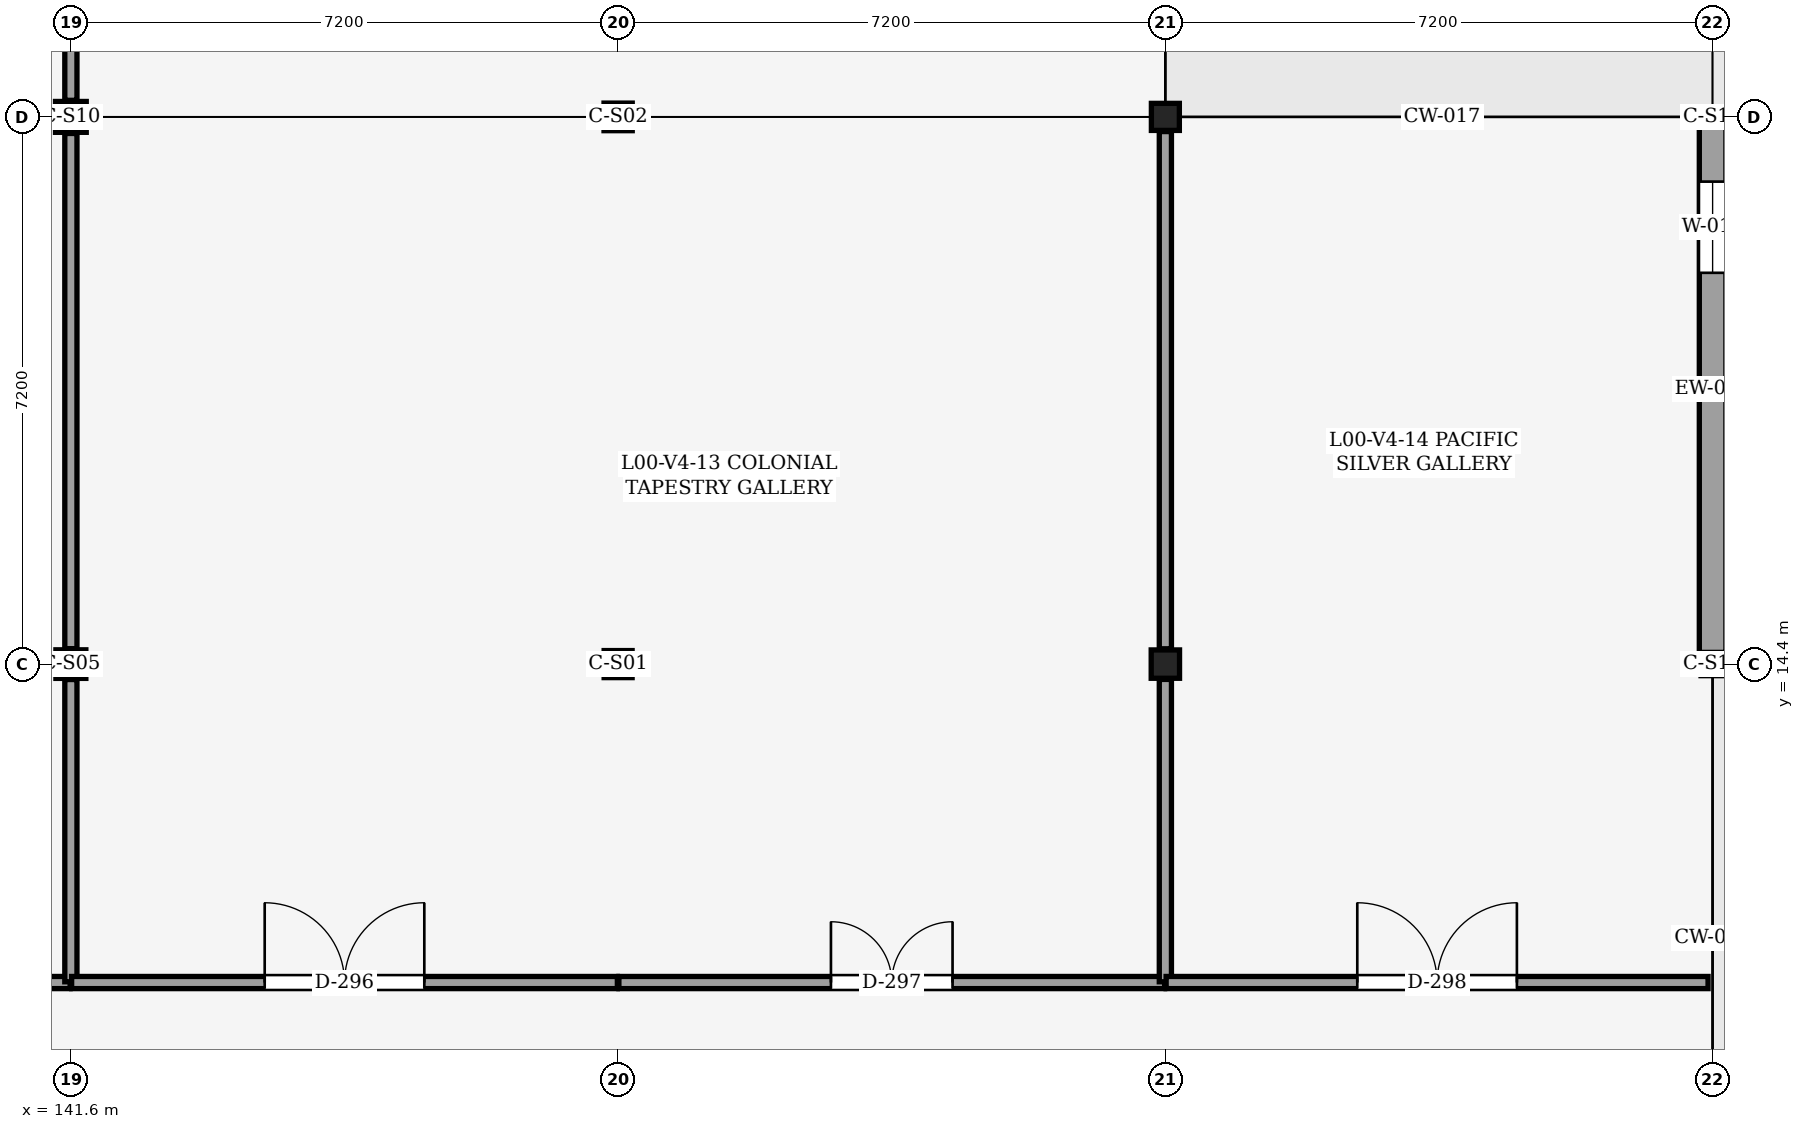
"""IFC4 building model, lengths in metres.
Left out: names, types, materials, properties, quantities, classifications, styles, units other than length and angle.
Written with IfcOpenShell. Run it as: python <this file> out.ifc"""

import sys

from ifc_helpers import new_model, si_unit, direction, frame, frame_2d, origin, origin_2d, place, context, subcontext, project, spatial, rectangle, hollow_rectangle, i_section, extrude, element, fill, save


model = new_model("IFC4")
c1 = context("Model", 3, precision=1e-05, world=origin(), true_north=direction((0.0, 1.0)))
c2 = subcontext(c1, "Body", "Model", "MODEL_VIEW")
j1 = project(units=[si_unit("LENGTHUNIT", "METRE"), si_unit("PLANEANGLEUNIT", "RADIAN")], contexts=[c1])
p1 = place(None, origin())
s1 = spatial("IfcSite", under=j1, at=p1, CompositionType="ELEMENT")
p2 = place(p1, origin())
s2 = spatial("IfcBuilding", under=s1, at=p2, CompositionType="ELEMENT")
p3 = place(p2, origin())
s3 = spatial("IfcBuildingStorey", under=s2, at=p3, CompositionType="ELEMENT", Elevation=0.0)
p4 = place(p3, frame((141.6, 14.4, 0.0), z_axis=(0.0, 0.0, 1.0), x_axis=(1.0, 0.0, 0.0)))
e1 = element("IfcColumn", 1, at=p4, inside=s3, PredefinedType="COLUMN", context=c2, shape_type="SweptSolid", body=[
    extrude(i_section(OverallWidth=0.394, OverallDepth=0.376, WebThickness=0.017, FlangeThickness=0.028, FilletRadius=0.025, at=origin_2d()), origin(), (0.0, 0.0, 1.0), 5.4),
])
p5 = place(p3, frame((141.6, 21.6, 0.0), z_axis=(0.0, 0.0, 1.0), x_axis=(1.0, 0.0, 0.0)))
e2 = element("IfcColumn", 2, at=p5, inside=s3, PredefinedType="COLUMN", context=c2, shape_type="SweptSolid", body=[
    extrude(i_section(OverallWidth=0.404, OverallDepth=0.406, WebThickness=0.027, FlangeThickness=0.044, FilletRadius=0.025, at=origin_2d()), origin(), (0.0, 0.0, 1.0), 5.4),
])
p6 = place(p3, frame((148.8, 14.4, 0.0), z_axis=(0.0, 0.0, 1.0), x_axis=(1.0, 0.0, 0.0)))
e3 = element("IfcColumn", 3, at=p6, inside=s3, PredefinedType="COLUMN", context=c2, shape_type="SweptSolid", body=[
    extrude(i_section(OverallWidth=0.368, OverallDepth=0.356, WebThickness=0.011, FlangeThickness=0.018, FilletRadius=0.025, at=origin_2d()), origin(), (0.0, 0.0, 1.0), 5.4),
])
p7 = place(p3, frame((148.8, 21.6, 0.0), z_axis=(0.0, 0.0, 1.0), x_axis=(1.0, 0.0, 0.0)))
e4 = element("IfcColumn", 4, at=p7, inside=s3, PredefinedType="COLUMN", context=c2, shape_type="SweptSolid", body=[
    extrude(i_section(OverallWidth=0.371, OverallDepth=0.363, WebThickness=0.013, FlangeThickness=0.022, FilletRadius=0.025, at=origin_2d()), origin(), (0.0, 0.0, 1.0), 5.4),
])
p8 = place(p3, frame((156.0, 14.4, 0.0), z_axis=(0.0, 0.0, 1.0), x_axis=(1.0, 0.0, 0.0)))
e5 = element("IfcColumn", 5, at=p8, inside=s3, PredefinedType="COLUMN", context=c2, shape_type="SweptSolid", body=[
    extrude(i_section(OverallWidth=0.373, OverallDepth=0.373, WebThickness=0.016, FlangeThickness=0.026, FilletRadius=0.025, at=origin_2d()), origin(), (0.0, 0.0, 1.0), 5.4),
])
p9 = place(p3, frame((156.0, 21.6, 0.0), z_axis=(0.0, 0.0, 1.0), x_axis=(1.0, 0.0, 0.0)))
e6 = element("IfcColumn", 6, at=p9, inside=s3, PredefinedType="COLUMN", context=c2, shape_type="SweptSolid", body=[
    extrude(i_section(OverallWidth=0.368, OverallDepth=0.356, WebThickness=0.011, FlangeThickness=0.018, FilletRadius=0.025, at=origin_2d()), origin(), (0.0, 0.0, 1.0), 5.4),
])
p10 = place(p3, frame((163.2, 14.4, 0.0), z_axis=(0.0, 0.0, 1.0), x_axis=(1.0, 0.0, 0.0)))
e7 = element("IfcColumn", 7, at=p10, inside=s3, PredefinedType="COLUMN", context=c2, shape_type="SweptSolid", body=[
    extrude(hollow_rectangle(XDim=0.305, YDim=0.305, WallThickness=0.016, OuterFilletRadius=0.032, at=origin_2d()), origin(), (0.0, 0.0, 1.0), 5.4),
])
p11 = place(p3, frame((163.2, 21.6, 0.0), z_axis=(0.0, 0.0, 1.0), x_axis=(1.0, 0.0, 0.0)))
e8 = element("IfcColumn", 8, at=p11, inside=s3, PredefinedType="COLUMN", context=c2, shape_type="SweptSolid", body=[
    extrude(hollow_rectangle(XDim=0.203, YDim=0.203, WallThickness=0.013, OuterFilletRadius=0.025, at=origin_2d()), origin(), (0.0, 0.0, 1.0), 5.4),
])
p12 = place(p3, frame((163.2, 21.498, 0.0), z_axis=(0.0, 0.0, 1.0), x_axis=(0.0, -1.0, 0.0)))
e9 = element("IfcWall", 9, at=p12, inside=s3, PredefinedType="SOLIDWALL", context=c2, shape_type="SweptSolid", body=[
    extrude(rectangle(XDim=6.946, YDim=0.35, at=frame_2d((3.473, 0.0))), origin(), (0.0, 0.0, 1.0), 4.533),
])
p13 = place(p12, frame((0.75, 0.0, 0.9)))
e10 = element("IfcOpeningElement", 10, at=p13, cuts=e9, PredefinedType="OPENING", context=c2, shape_type="SweptSolid", body=[
    extrude(rectangle(XDim=1.2, YDim=1.5, at=frame_2d((0.6, 0.75))), frame((0.0, 0.185, 0.0), z_axis=(0.0, -1.0, 0.0), x_axis=(1.0, 0.0, 0.0)), (0.0, 0.0, 1.0), 0.371),
])
p14 = place(p3, frame((134.41, 10.21, 0.0), z_axis=(0.0, 0.0, 1.0), x_axis=(1.0, 0.0, 0.0)))
e11 = element("IfcWall", 11, at=p14, inside=s3, PredefinedType="PARTITIONING", context=c2, shape_type="SweptSolid", body=[
    extrude(rectangle(XDim=7.18, YDim=0.16, at=frame_2d((3.59, 0.0))), origin(), (0.0, 0.0, 1.0), 5.14),
])
p15 = place(p14, frame((2.815, 0.0, 0.0)))
e12 = element("IfcOpeningElement", 12, at=p15, cuts=e11, PredefinedType="OPENING", context=c2, shape_type="SweptSolid", body=[
    extrude(rectangle(XDim=1.55, YDim=2.3, at=frame_2d((0.775, 1.15))), frame((0.0, 0.09, 0.0), z_axis=(0.0, -1.0, 0.0), x_axis=(1.0, 0.0, 0.0)), (0.0, 0.0, 1.0), 0.18),
])
p16 = place(p3, frame((141.6, 10.22, 0.0), z_axis=(0.0, 0.0, 1.0), x_axis=(0.0, 1.0, 0.0)))
e13 = element("IfcWall", 13, at=p16, inside=s3, PredefinedType="PARTITIONING", context=c2, shape_type="SweptSolid", body=[
    extrude(rectangle(XDim=3.977, YDim=0.16, at=frame_2d((1.989, 0.0))), origin(), (0.0, 0.0, 1.0), 4.533),
])
p17 = place(p3, frame((141.6, 14.603, 0.0), z_axis=(0.0, 0.0, 1.0), x_axis=(0.0, 1.0, 0.0)))
e14 = element("IfcWall", 14, at=p17, inside=s3, PredefinedType="PARTITIONING", context=c2, shape_type="SweptSolid", body=[
    extrude(rectangle(XDim=6.779, YDim=0.16, at=frame_2d((3.39, 0.0))), origin(), (0.0, 0.0, 1.0), 4.607),
])
p18 = place(p3, frame((141.61, 10.21, 0.0), z_axis=(0.0, 0.0, 1.0), x_axis=(1.0, 0.0, 0.0)))
e15 = element("IfcWall", 15, at=p18, inside=s3, PredefinedType="PARTITIONING", context=c2, shape_type="SweptSolid", body=[
    extrude(rectangle(XDim=7.18, YDim=0.16, at=frame_2d((3.59, 0.0))), origin(), (0.0, 0.0, 1.0), 5.14),
])
p19 = place(p18, frame((2.54, 0.0, 0.0)))
e16 = element("IfcOpeningElement", 16, at=p19, cuts=e15, PredefinedType="OPENING", context=c2, shape_type="SweptSolid", body=[
    extrude(rectangle(XDim=2.1, YDim=2.5, at=frame_2d((1.05, 1.25))), frame((0.0, 0.09, 0.0), z_axis=(0.0, -1.0, 0.0), x_axis=(1.0, 0.0, 0.0)), (0.0, 0.0, 1.0), 0.18),
])
p20 = place(p3, frame((148.81, 10.21, 0.0), z_axis=(0.0, 0.0, 1.0), x_axis=(1.0, 0.0, 0.0)))
e17 = element("IfcWall", 17, at=p20, inside=s3, PredefinedType="PARTITIONING", context=c2, shape_type="SweptSolid", body=[
    extrude(rectangle(XDim=7.18, YDim=0.16, at=frame_2d((3.59, 0.0))), origin(), (0.0, 0.0, 1.0), 5.14),
])
p21 = place(p20, frame((2.79, 0.0, 0.0)))
e18 = element("IfcOpeningElement", 18, at=p21, cuts=e17, PredefinedType="OPENING", context=c2, shape_type="SweptSolid", body=[
    extrude(rectangle(XDim=1.6, YDim=2.35, at=frame_2d((0.8, 1.175))), frame((0.0, 0.09, 0.0), z_axis=(0.0, -1.0, 0.0), x_axis=(1.0, 0.0, 0.0)), (0.0, 0.0, 1.0), 0.18),
])
p22 = place(p3, frame((156.0, 10.22, 0.0), z_axis=(0.0, 0.0, 1.0), x_axis=(0.0, 1.0, 0.0)))
e19 = element("IfcWall", 19, at=p22, inside=s3, PredefinedType="PARTITIONING", context=c2, shape_type="SweptSolid", body=[
    extrude(rectangle(XDim=3.979, YDim=0.16, at=frame_2d((1.989, 0.0))), origin(), (0.0, 0.0, 1.0), 4.678),
])
p23 = place(p3, frame((156.0, 14.602, 0.0), z_axis=(0.0, 0.0, 1.0), x_axis=(0.0, 1.0, 0.0)))
e20 = element("IfcWall", 20, at=p23, inside=s3, PredefinedType="PARTITIONING", context=c2, shape_type="SweptSolid", body=[
    extrude(rectangle(XDim=6.805, YDim=0.16, at=frame_2d((3.403, 0.0))), origin(), (0.0, 0.0, 1.0), 4.528),
])
p24 = place(p3, frame((156.01, 10.21, 0.0), z_axis=(0.0, 0.0, 1.0), x_axis=(1.0, 0.0, 0.0)))
e21 = element("IfcWall", 21, at=p24, inside=s3, PredefinedType="PARTITIONING", context=c2, shape_type="SweptSolid", body=[
    extrude(rectangle(XDim=7.13, YDim=0.16, at=frame_2d((3.565, 0.0))), origin(), (0.0, 0.0, 1.0), 5.14),
])
p25 = place(p24, frame((2.515, 0.0, 0.0)))
e22 = element("IfcOpeningElement", 22, at=p25, cuts=e21, PredefinedType="OPENING", context=c2, shape_type="SweptSolid", body=[
    extrude(rectangle(XDim=2.1, YDim=2.5, at=frame_2d((1.05, 1.25))), frame((0.0, 0.09, 0.0), z_axis=(0.0, -1.0, 0.0), x_axis=(1.0, 0.0, 0.0)), (0.0, 0.0, 1.0), 0.18),
])
p26 = place(p3, frame((141.6, 21.818, 0.0), z_axis=(0.0, 0.0, 1.0), x_axis=(0.0, 1.0, 0.0)))
e23 = element("IfcWall", 23, at=p26, inside=s3, PredefinedType="PARTITIONING", context=c2, shape_type="SweptSolid", body=[
    extrude(rectangle(XDim=7.958, YDim=0.16, at=frame_2d((3.979, 0.0))), origin(), (0.0, 0.0, 1.0), 4.447),
])
p27 = place(p13, origin())
e24 = element("IfcWindow", 24, at=p27, inside=s3, PartitioningType="SINGLE_PANEL", PredefinedType="WINDOW", context=c2, shape_type="SweptSolid", body=[
    extrude(rectangle(XDim=1.2, YDim=1.5, at=frame_2d((0.6, 0.75))), frame((0.0, 0.03, 0.0), z_axis=(0.0, -1.0, 0.0), x_axis=(1.0, 0.0, 0.0)), (0.0, 0.0, 1.0), 0.06),
])
fill(e10, e24)
p28 = place(p19, origin())
e25 = element("IfcDoor", 25, at=p28, inside=s3, OperationType="DOUBLE_DOOR_SINGLE_SWING", PredefinedType="DOOR", context=c2, shape_type="SweptSolid", body=[
    extrude(rectangle(XDim=2.1, YDim=2.5, at=frame_2d((1.05, 1.25))), frame((0.0, 0.025, 0.0), z_axis=(0.0, -1.0, 0.0), x_axis=(1.0, 0.0, 0.0)), (0.0, 0.0, 1.0), 0.05),
])
fill(e16, e25)
p29 = place(p21, origin())
e26 = element("IfcDoor", 26, at=p29, inside=s3, OperationType="DOUBLE_DOOR_SINGLE_SWING", PredefinedType="DOOR", context=c2, shape_type="SweptSolid", body=[
    extrude(rectangle(XDim=1.6, YDim=2.35, at=frame_2d((0.8, 1.175))), frame((0.0, 0.025, 0.0), z_axis=(0.0, -1.0, 0.0), x_axis=(1.0, 0.0, 0.0)), (0.0, 0.0, 1.0), 0.05),
])
fill(e18, e26)
p30 = place(p25, origin())
e27 = element("IfcDoor", 27, at=p30, inside=s3, OperationType="DOUBLE_DOOR_SINGLE_SWING", PredefinedType="DOOR", context=c2, shape_type="SweptSolid", body=[
    extrude(rectangle(XDim=2.1, YDim=2.5, at=frame_2d((1.05, 1.25))), frame((0.0, 0.025, 0.0), z_axis=(0.0, -1.0, 0.0), x_axis=(1.0, 0.0, 0.0)), (0.0, 0.0, 1.0), 0.05),
])
fill(e22, e27)
save(model, sys.argv[1])
